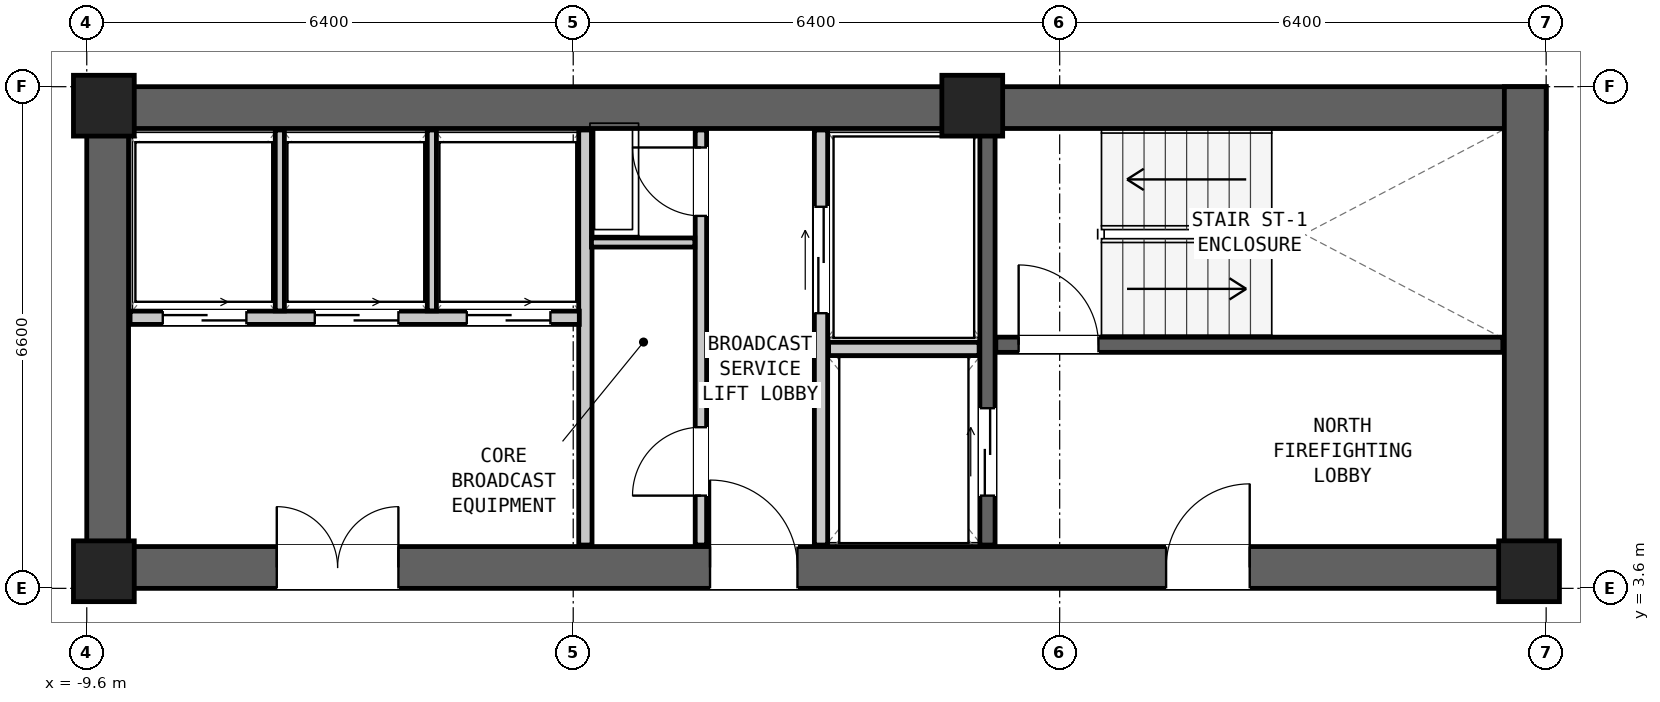
"""IFC4 building model, lengths in metres.
Left out: names, types, materials, properties, quantities, classifications, styles, units other than length and angle.
Written with IfcOpenShell. Run it as: python <this file> out.ifc"""

import sys

from ifc_helpers import new_model, si_unit, direction, frame, frame_2d, origin, origin_2d, place, context, subcontext, project, spatial, rectangle, extrude, element, fill, save


model = new_model("IFC4")
c1 = context("Model", 3, precision=1e-05, world=origin(), true_north=direction((0.0, 1.0)))
c2 = subcontext(c1, "Body", "Model", "MODEL_VIEW")
j1 = project(units=[si_unit("LENGTHUNIT", "METRE"), si_unit("PLANEANGLEUNIT", "RADIAN")], contexts=[c1])
p1 = place(None, origin())
s1 = spatial("IfcSite", under=j1, at=p1, CompositionType="ELEMENT")
p2 = place(p1, origin())
s2 = spatial("IfcBuilding", under=s1, at=p2, CompositionType="ELEMENT")
p3 = place(p2, frame((0.0, 0.0, 47.45)))
s3 = spatial("IfcBuildingStorey", under=s2, at=p3, CompositionType="ELEMENT", Elevation=47.45)
p4 = place(p3, frame((-9.6, 9.925, 0.0), z_axis=(0.0, 0.0, 1.0), x_axis=(1.0, 0.0, 0.0)))
e1 = element("IfcWall", 1, at=p4, inside=s3, PredefinedType="SHEAR", context=c2, shape_type="SweptSolid", body=[
    extrude(rectangle(XDim=19.2, YDim=0.55, at=frame_2d((9.6, 0.0))), origin(), (0.0, 0.0, 1.0), 3.05),
])
p5 = place(p3, frame((-9.6, 3.875, 0.0), z_axis=(0.0, 0.0, 1.0), x_axis=(1.0, 0.0, 0.0)))
e2 = element("IfcWall", 2, at=p5, inside=s3, PredefinedType="SHEAR", context=c2, shape_type="SweptSolid", body=[
    extrude(rectangle(XDim=19.2, YDim=0.55, at=frame_2d((9.6, 0.0))), origin(), (0.0, 0.0, 1.0), 3.05),
])
p6 = place(p5, frame((14.2, 0.0, 0.0)))
e3 = element("IfcOpeningElement", 3, at=p6, cuts=e2, PredefinedType="OPENING", context=c2, shape_type="SweptSolid", body=[
    extrude(rectangle(XDim=1.1, YDim=2.08, at=frame_2d((0.55, 1.04))), frame((0.0, 0.287, 0.0), z_axis=(0.0, -1.0, 0.0), x_axis=(1.0, 0.0, 0.0)), (0.0, 0.0, 1.0), 0.574),
])
p7 = place(p5, frame((8.2, 0.0, 0.0)))
e4 = element("IfcOpeningElement", 4, at=p7, cuts=e2, PredefinedType="OPENING", context=c2, shape_type="SweptSolid", body=[
    extrude(rectangle(XDim=1.15, YDim=2.1, at=frame_2d((0.575, 1.05))), frame((0.0, 0.287, 0.0), z_axis=(0.0, -1.0, 0.0), x_axis=(1.0, 0.0, 0.0)), (0.0, 0.0, 1.0), 0.574),
])
p8 = place(p5, frame((2.5, 0.0, 0.0)))
e5 = element("IfcOpeningElement", 5, at=p8, cuts=e2, PredefinedType="OPENING", context=c2, shape_type="SweptSolid", body=[
    extrude(rectangle(XDim=1.6, YDim=2.12, at=frame_2d((0.8, 1.06))), frame((0.0, 0.287, 0.0), z_axis=(0.0, -1.0, 0.0), x_axis=(1.0, 0.0, 0.0)), (0.0, 0.0, 1.0), 0.574),
])
for number, where, z_axis, x_axis in (
    (6, (-9.325, 3.6, 0.0), (0.0, 0.0, 1.0), (0.0, 1.0, 0.0)),
    (7, (9.325, 3.6, 0.0), (0.0, 0.0, 1.0), (0.0, 1.0, 0.0)),
):
    element("IfcWall", number, at=place(p3, frame(where, z_axis=z_axis, x_axis=x_axis)), inside=s3, PredefinedType="SHEAR", context=c2, shape_type="SweptSolid", body=[
        extrude(rectangle(XDim=6.6, YDim=0.55, at=frame_2d((3.3, 0.0))), origin(), (0.0, 0.0, 1.0), 3.05),
    ])
for number, where, z_axis, x_axis in (
    (8, (-9.375, 9.95, 0.0), (0.0, 0.0, 1.0), (1.0, 0.0, 0.0)),
    (9, (2.05, 9.95, 0.0), (0.0, 0.0, 1.0), (1.0, 0.0, 0.0)),
    (10, (-9.375, 3.825, 0.0), (0.0, 0.0, 1.0), (1.0, 0.0, 0.0)),
    (11, (9.375, 3.825, 0.0), (0.0, 0.0, 1.0), (1.0, 0.0, 0.0)),
):
    element("IfcColumn", number, at=place(p3, frame(where, z_axis=z_axis, x_axis=x_axis)), inside=s3, PredefinedType="COLUMN", context=c2, shape_type="SweptSolid", body=[
        extrude(rectangle(XDim=0.8, YDim=0.8, at=origin_2d()), origin(), (0.0, 0.0, 1.0), 3.05),
    ])
p9 = place(p3, frame((2.36, 6.805, 0.0), z_axis=(0.0, 0.0, 1.0), x_axis=(1.0, 0.0, 0.0)))
e12 = element("IfcWall", 12, at=p9, inside=s3, PredefinedType="SHEAR", context=c2, shape_type="SweptSolid", body=[
    extrude(rectangle(XDim=6.67, YDim=0.2, at=frame_2d((3.335, 0.0))), origin(), (0.0, 0.0, 1.0), 2.83),
])
p10 = place(p9, frame((0.3, 0.0, 0.0)))
e13 = element("IfcOpeningElement", 13, at=p10, cuts=e12, PredefinedType="OPENING", context=c2, shape_type="SweptSolid", body=[
    extrude(rectangle(XDim=1.05, YDim=2.08, at=frame_2d((0.525, 1.04))), frame((0.0, 0.112, 0.0), z_axis=(0.0, -1.0, 0.0), x_axis=(1.0, 0.0, 0.0)), (0.0, 0.0, 1.0), 0.224),
])
p11 = place(p3, frame((2.25, 4.17, 0.0), z_axis=(0.0, 0.0, 1.0), x_axis=(0.0, 1.0, 0.0)))
e14 = element("IfcWall", 14, at=p11, inside=s3, PredefinedType="SHEAR", context=c2, shape_type="SweptSolid", body=[
    extrude(rectangle(XDim=5.46, YDim=0.2, at=frame_2d((2.73, 0.0))), origin(), (0.0, 0.0, 1.0), 2.83),
])
p12 = place(p11, frame((0.65, 0.0, 0.0)))
e15 = element("IfcOpeningElement", 15, at=p12, cuts=e14, PredefinedType="OPENING", context=c2, shape_type="SweptSolid", body=[
    extrude(rectangle(XDim=1.15, YDim=2.08, at=frame_2d((0.575, 1.04))), frame((0.0, 0.112, 0.0), z_axis=(0.0, -1.0, 0.0), x_axis=(1.0, 0.0, 0.0)), (0.0, 0.0, 1.0), 0.224),
])
p13 = place(p3, frame((0.06, 4.17, 0.0), z_axis=(0.0, 0.0, 1.0), x_axis=(0.0, 1.0, 0.0)))
e16 = element("IfcWall", 16, at=p13, inside=s3, PredefinedType="PARTITIONING", context=c2, shape_type="SweptSolid", body=[
    extrude(rectangle(XDim=5.46, YDim=0.175, at=frame_2d((2.73, 0.0))), origin(), (0.0, 0.0, 1.0), 2.83),
])
p14 = place(p13, frame((3.05, 0.0, 0.0)))
e17 = element("IfcOpeningElement", 17, at=p14, cuts=e16, PredefinedType="OPENING", context=c2, shape_type="SweptSolid", body=[
    extrude(rectangle(XDim=1.4, YDim=2.12, at=frame_2d((0.7, 1.06))), frame((0.0, 0.1, 0.0), z_axis=(0.0, -1.0, 0.0), x_axis=(1.0, 0.0, 0.0)), (0.0, 0.0, 1.0), 0.199),
])
p15 = place(p3, frame((0.16, 6.75, 0.0), z_axis=(0.0, 0.0, 1.0), x_axis=(1.0, 0.0, 0.0)))
e18 = element("IfcWall", 18, at=p15, inside=s3, PredefinedType="PARTITIONING", context=c2, shape_type="SweptSolid", body=[
    extrude(rectangle(XDim=1.98, YDim=0.175, at=frame_2d((0.99, 0.0))), origin(), (0.0, 0.0, 1.0), 2.83),
])
p16 = place(p3, frame((-3.04, 4.17, 0.0), z_axis=(0.0, 0.0, 1.0), x_axis=(0.0, 1.0, 0.0)))
e19 = element("IfcWall", 19, at=p16, inside=s3, PredefinedType="PARTITIONING", context=c2, shape_type="SweptSolid", body=[
    extrude(rectangle(XDim=5.46, YDim=0.175, at=frame_2d((2.73, 0.0))), origin(), (0.0, 0.0, 1.0), 2.83),
])
p17 = place(p3, frame((-1.52, 4.17, 0.0), z_axis=(0.0, 0.0, 1.0), x_axis=(0.0, 1.0, 0.0)))
e20 = element("IfcWall", 20, at=p17, inside=s3, PredefinedType="PARTITIONING", context=c2, shape_type="SweptSolid", body=[
    extrude(rectangle(XDim=5.46, YDim=0.15, at=frame_2d((2.73, 0.0))), origin(), (0.0, 0.0, 1.0), 2.83),
])
p18 = place(p17, frame((4.33, 0.0, 0.0)))
e21 = element("IfcOpeningElement", 21, at=p18, cuts=e20, PredefinedType="OPENING", context=c2, shape_type="SweptSolid", body=[
    extrude(rectangle(XDim=0.9, YDim=2.05, at=frame_2d((0.45, 1.025))), frame((0.0, 0.087, 0.0), z_axis=(0.0, -1.0, 0.0), x_axis=(1.0, 0.0, 0.0)), (0.0, 0.0, 1.0), 0.174),
])
p19 = place(p17, frame((0.65, 0.0, 0.0)))
e22 = element("IfcOpeningElement", 22, at=p19, cuts=e20, PredefinedType="OPENING", context=c2, shape_type="SweptSolid", body=[
    extrude(rectangle(XDim=0.9, YDim=2.05, at=frame_2d((0.45, 1.025))), frame((0.0, 0.087, 0.0), z_axis=(0.0, -1.0, 0.0), x_axis=(1.0, 0.0, 0.0)), (0.0, 0.0, 1.0), 0.174),
])
p20 = place(p3, frame((-2.96, 8.15, 0.0), z_axis=(0.0, 0.0, 1.0), x_axis=(1.0, 0.0, 0.0)))
e23 = element("IfcWall", 23, at=p20, inside=s3, PredefinedType="PARTITIONING", context=c2, shape_type="SweptSolid", body=[
    extrude(rectangle(XDim=1.36, YDim=0.12, at=frame_2d((0.68, 0.0))), origin(), (0.0, 0.0, 1.0), 2.83),
])
p21 = place(p3, frame((-9.03, 7.16, 0.0), z_axis=(0.0, 0.0, 1.0), x_axis=(1.0, 0.0, 0.0)))
e24 = element("IfcWall", 24, at=p21, inside=s3, PredefinedType="PARTITIONING", context=c2, shape_type="SweptSolid", body=[
    extrude(rectangle(XDim=5.91, YDim=0.175, at=frame_2d((2.955, 0.0))), origin(), (0.0, 0.0, 1.0), 2.83),
])
p22 = place(p21, frame((0.43, 0.0, 0.0)))
e25 = element("IfcOpeningElement", 25, at=p22, cuts=e24, PredefinedType="OPENING", context=c2, shape_type="SweptSolid", body=[
    extrude(rectangle(XDim=1.1, YDim=2.06, at=frame_2d((0.55, 1.03))), frame((0.0, 0.1, 0.0), z_axis=(0.0, -1.0, 0.0), x_axis=(1.0, 0.0, 0.0)), (0.0, 0.0, 1.0), 0.199),
])
p23 = place(p21, frame((2.43, 0.0, 0.0)))
e26 = element("IfcOpeningElement", 26, at=p23, cuts=e24, PredefinedType="OPENING", context=c2, shape_type="SweptSolid", body=[
    extrude(rectangle(XDim=1.1, YDim=2.06, at=frame_2d((0.55, 1.03))), frame((0.0, 0.1, 0.0), z_axis=(0.0, -1.0, 0.0), x_axis=(1.0, 0.0, 0.0)), (0.0, 0.0, 1.0), 0.199),
])
p24 = place(p21, frame((4.43, 0.0, 0.0)))
e27 = element("IfcOpeningElement", 27, at=p24, cuts=e24, PredefinedType="OPENING", context=c2, shape_type="SweptSolid", body=[
    extrude(rectangle(XDim=1.1, YDim=2.06, at=frame_2d((0.55, 1.03))), frame((0.0, 0.1, 0.0), z_axis=(0.0, -1.0, 0.0), x_axis=(1.0, 0.0, 0.0)), (0.0, 0.0, 1.0), 0.199),
])
for number, where, z_axis, x_axis in (
    (28, (-7.06, 7.25, 0.0), (0.0, 0.0, 1.0), (0.0, 1.0, 0.0)),
    (29, (-5.06, 7.25, 0.0), (0.0, 0.0, 1.0), (0.0, 1.0, 0.0)),
):
    element("IfcWall", number, at=place(p3, frame(where, z_axis=z_axis, x_axis=x_axis)), inside=s3, PredefinedType="PARTITIONING", context=c2, shape_type="SweptSolid", body=[
        extrude(rectangle(XDim=2.38, YDim=0.12, at=frame_2d((1.19, 0.0))), origin(), (0.0, 0.0, 1.0), 2.83),
    ])
p25 = place(p10, origin())
e30 = element("IfcDoor", 30, at=p25, inside=s3, OperationType="SINGLE_SWING_LEFT", PredefinedType="DOOR", context=c2, shape_type="SweptSolid", body=[
    extrude(rectangle(XDim=1.05, YDim=2.08, at=frame_2d((0.525, 1.04))), frame((0.0, 0.025, 0.0), z_axis=(0.0, -1.0, 0.0), x_axis=(1.0, 0.0, 0.0)), (0.0, 0.0, 1.0), 0.05),
])
fill(e13, e30)
p26 = place(p6, origin())
e31 = element("IfcDoor", 31, at=p26, inside=s3, OperationType="SINGLE_SWING_RIGHT", PredefinedType="DOOR", context=c2, shape_type="SweptSolid", body=[
    extrude(rectangle(XDim=1.1, YDim=2.08, at=frame_2d((0.55, 1.04))), frame((0.0, 0.025, 0.0), z_axis=(0.0, -1.0, 0.0), x_axis=(1.0, 0.0, 0.0)), (0.0, 0.0, 1.0), 0.05),
])
fill(e3, e31)
p27 = place(p12, origin())
e32 = element("IfcDoor", 32, at=p27, inside=s3, OperationType="DOUBLE_DOOR_SLIDING", PredefinedType="DOOR", context=c2, shape_type="SweptSolid", body=[
    extrude(rectangle(XDim=1.15, YDim=2.08, at=frame_2d((0.575, 1.04))), frame((0.0, 0.025, 0.0), z_axis=(0.0, -1.0, 0.0), x_axis=(1.0, 0.0, 0.0)), (0.0, 0.0, 1.0), 0.05),
])
fill(e15, e32)
p28 = place(p14, origin())
e33 = element("IfcDoor", 33, at=p28, inside=s3, OperationType="DOUBLE_DOOR_SLIDING", PredefinedType="DOOR", context=c2, shape_type="SweptSolid", body=[
    extrude(rectangle(XDim=1.4, YDim=2.12, at=frame_2d((0.7, 1.06))), frame((0.0, 0.025, 0.0), z_axis=(0.0, -1.0, 0.0), x_axis=(1.0, 0.0, 0.0)), (0.0, 0.0, 1.0), 0.05),
])
fill(e17, e33)
p29 = place(p7, origin())
e34 = element("IfcDoor", 34, at=p29, inside=s3, OperationType="SINGLE_SWING_LEFT", PredefinedType="DOOR", context=c2, shape_type="SweptSolid", body=[
    extrude(rectangle(XDim=1.15, YDim=2.1, at=frame_2d((0.575, 1.05))), frame((0.0, 0.025, 0.0), z_axis=(0.0, -1.0, 0.0), x_axis=(1.0, 0.0, 0.0)), (0.0, 0.0, 1.0), 0.05),
])
fill(e4, e34)
p30 = place(p18, origin())
e35 = element("IfcDoor", 35, at=p30, inside=s3, OperationType="SINGLE_SWING_RIGHT", PredefinedType="DOOR", context=c2, shape_type="SweptSolid", body=[
    extrude(rectangle(XDim=0.9, YDim=2.05, at=frame_2d((0.45, 1.025))), frame((0.0, 0.025, 0.0), z_axis=(0.0, -1.0, 0.0), x_axis=(1.0, 0.0, 0.0)), (0.0, 0.0, 1.0), 0.05),
])
fill(e21, e35)
p31 = place(p19, origin())
e36 = element("IfcDoor", 36, at=p31, inside=s3, OperationType="SINGLE_SWING_LEFT", PredefinedType="DOOR", context=c2, shape_type="SweptSolid", body=[
    extrude(rectangle(XDim=0.9, YDim=2.05, at=frame_2d((0.45, 1.025))), frame((0.0, 0.025, 0.0), z_axis=(0.0, -1.0, 0.0), x_axis=(1.0, 0.0, 0.0)), (0.0, 0.0, 1.0), 0.05),
])
fill(e22, e36)
p32 = place(p22, origin())
e37 = element("IfcDoor", 37, at=p32, inside=s3, OperationType="DOUBLE_DOOR_SLIDING", PredefinedType="DOOR", context=c2, shape_type="SweptSolid", body=[
    extrude(rectangle(XDim=1.1, YDim=2.06, at=frame_2d((0.55, 1.03))), frame((0.0, 0.025, 0.0), z_axis=(0.0, -1.0, 0.0), x_axis=(1.0, 0.0, 0.0)), (0.0, 0.0, 1.0), 0.05),
])
fill(e25, e37)
p33 = place(p23, origin())
e38 = element("IfcDoor", 38, at=p33, inside=s3, OperationType="DOUBLE_DOOR_SLIDING", PredefinedType="DOOR", context=c2, shape_type="SweptSolid", body=[
    extrude(rectangle(XDim=1.1, YDim=2.06, at=frame_2d((0.55, 1.03))), frame((0.0, 0.025, 0.0), z_axis=(0.0, -1.0, 0.0), x_axis=(1.0, 0.0, 0.0)), (0.0, 0.0, 1.0), 0.05),
])
fill(e26, e38)
p34 = place(p24, origin())
e39 = element("IfcDoor", 39, at=p34, inside=s3, OperationType="DOUBLE_DOOR_SLIDING", PredefinedType="DOOR", context=c2, shape_type="SweptSolid", body=[
    extrude(rectangle(XDim=1.1, YDim=2.06, at=frame_2d((0.55, 1.03))), frame((0.0, 0.025, 0.0), z_axis=(0.0, -1.0, 0.0), x_axis=(1.0, 0.0, 0.0)), (0.0, 0.0, 1.0), 0.05),
])
fill(e27, e39)
p35 = place(p8, origin())
e40 = element("IfcDoor", 40, at=p35, inside=s3, OperationType="DOUBLE_DOOR_SINGLE_SWING", PredefinedType="DOOR", context=c2, shape_type="SweptSolid", body=[
    extrude(rectangle(XDim=1.6, YDim=2.12, at=frame_2d((0.8, 1.06))), frame((0.0, 0.025, 0.0), z_axis=(0.0, -1.0, 0.0), x_axis=(1.0, 0.0, 0.0)), (0.0, 0.0, 1.0), 0.05),
])
fill(e5, e40)
save(model, sys.argv[1])
